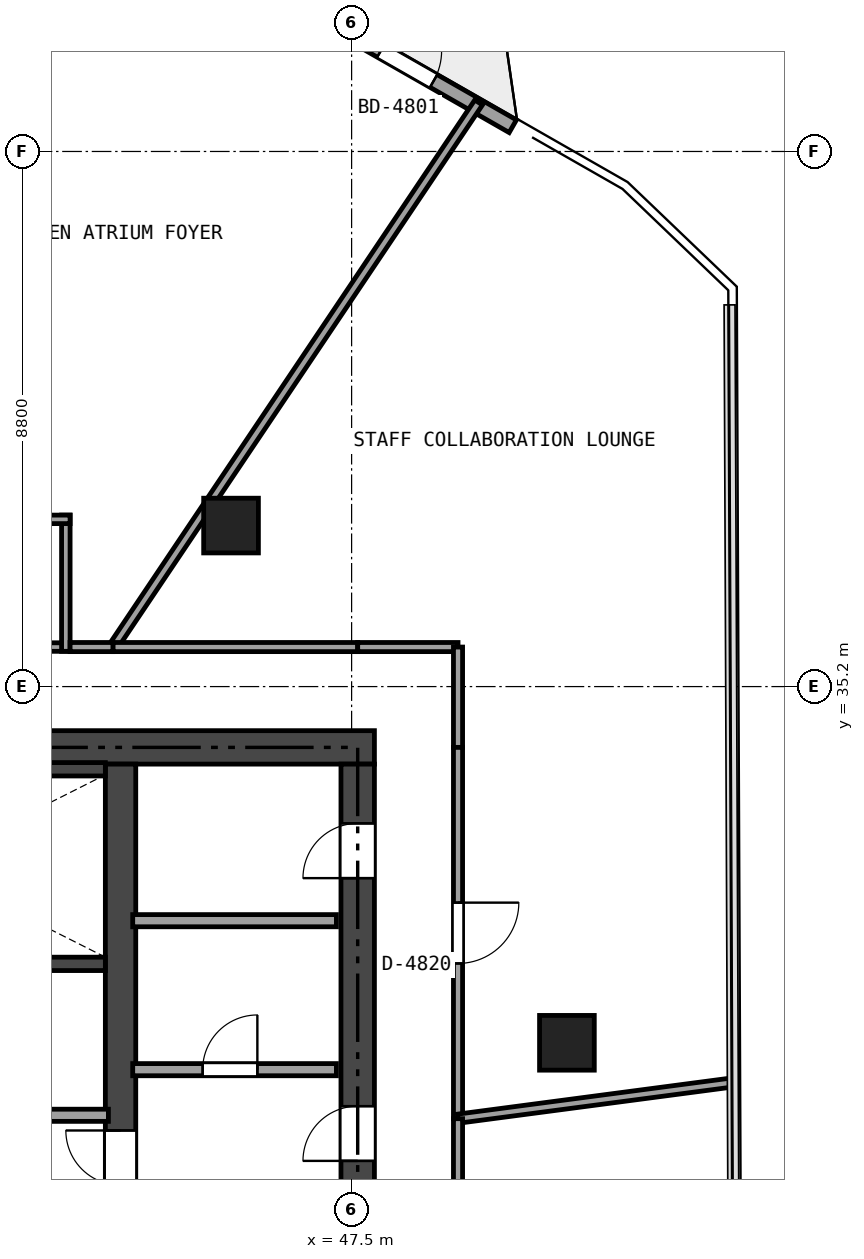
"""IFC4 building model, lengths in metres.
Left out: names, types, materials, properties, quantities, classifications, styles, units other than length and angle.
Written with IfcOpenShell. Run it as: python <this file> out.ifc"""

import sys

from ifc_helpers import new_model, si_unit, direction, frame, frame_2d, origin, origin_2d, place, context, subcontext, project, spatial, rectangle, extrude, element, fill, save


model = new_model("IFC4")
c1 = context("Model", 3, precision=1e-05, world=origin(), true_north=direction((0.0, 1.0)))
c2 = subcontext(c1, "Body", "Model", "MODEL_VIEW")
j1 = project(units=[si_unit("LENGTHUNIT", "METRE"), si_unit("PLANEANGLEUNIT", "RADIAN")], contexts=[c1])
p1 = place(None, origin())
s1 = spatial("IfcSite", under=j1, at=p1, CompositionType="ELEMENT")
p2 = place(p1, origin())
s2 = spatial("IfcBuilding", under=s1, at=p2, CompositionType="ELEMENT")
p3 = place(p2, frame((0.0, 0.0, 180.6)))
s3 = spatial("IfcBuildingStorey", under=s2, at=p3, CompositionType="ELEMENT", Elevation=180.6)
p4 = place(p3, frame((26.525, 34.2, 0.0), z_axis=(0.0, 0.0, 1.0), x_axis=(1.0, 0.0, 0.0)))
e1 = element("IfcWall", 1, at=p4, inside=s3, PredefinedType="SHEAR", context=c2, shape_type="SweptSolid", body=[
    extrude(rectangle(XDim=21.35, YDim=0.55, at=frame_2d((10.675, 0.0))), origin(), (0.0, 0.0, 1.0), 3.32),
])
p5 = place(p4, frame((9.675, 0.0, 0.0)))
e2 = element("IfcOpeningElement", 2, at=p5, cuts=e1, PredefinedType="OPENING", context=c2, shape_type="SweptSolid", body=[
    extrude(rectangle(XDim=1.1, YDim=2.15, at=frame_2d((0.55, 1.075))), frame((0.0, 0.285, 0.0), z_axis=(0.0, -1.0, 0.0), x_axis=(1.0, 0.0, 0.0)), (0.0, 0.0, 1.0), 0.57),
])
p6 = place(p4, frame((1.925, 0.0, 0.0)))
e3 = element("IfcOpeningElement", 3, at=p6, cuts=e1, PredefinedType="OPENING", context=c2, shape_type="SweptSolid", body=[
    extrude(rectangle(XDim=0.9, YDim=2.1, at=frame_2d((0.45, 1.05))), frame((0.0, 0.285, 0.0), z_axis=(0.0, -1.0, 0.0), x_axis=(1.0, 0.0, 0.0)), (0.0, 0.0, 1.0), 0.57),
])
p7 = place(p4, frame((6.225, 0.0, 0.0)))
e4 = element("IfcOpeningElement", 4, at=p7, cuts=e1, PredefinedType="OPENING", context=c2, shape_type="SweptSolid", body=[
    extrude(rectangle(XDim=0.9, YDim=2.1, at=frame_2d((0.45, 1.05))), frame((0.0, 0.285, 0.0), z_axis=(0.0, -1.0, 0.0), x_axis=(1.0, 0.0, 0.0)), (0.0, 0.0, 1.0), 0.57),
])
p8 = place(p3, frame((47.6, 18.875, 0.0), z_axis=(0.0, 0.0, 1.0), x_axis=(0.0, 1.0, 0.0)))
e5 = element("IfcWall", 5, at=p8, inside=s3, PredefinedType="SHEAR", context=c2, shape_type="SweptSolid", body=[
    extrude(rectangle(XDim=15.05, YDim=0.55, at=frame_2d((7.525, 0.0))), origin(), (0.0, 0.0, 1.0), 3.32),
])
p9 = place(p8, frame((6.625, 0.0, 0.0)))
e6 = element("IfcOpeningElement", 6, at=p9, cuts=e5, PredefinedType="OPENING", context=c2, shape_type="SweptSolid", body=[
    extrude(rectangle(XDim=1.1, YDim=2.15, at=frame_2d((0.55, 1.075))), frame((0.0, 0.285, 0.0), z_axis=(0.0, -1.0, 0.0), x_axis=(1.0, 0.0, 0.0)), (0.0, 0.0, 1.0), 0.57),
])
p10 = place(p8, frame((8.525, 0.0, 0.0)))
e7 = element("IfcOpeningElement", 7, at=p10, cuts=e5, PredefinedType="OPENING", context=c2, shape_type="SweptSolid", body=[
    extrude(rectangle(XDim=0.9, YDim=2.1, at=frame_2d((0.45, 1.05))), frame((0.0, 0.285, 0.0), z_axis=(0.0, -1.0, 0.0), x_axis=(1.0, 0.0, 0.0)), (0.0, 0.0, 1.0), 0.57),
])
p11 = place(p8, frame((13.175, 0.0, 0.0)))
e8 = element("IfcOpeningElement", 8, at=p11, cuts=e5, PredefinedType="OPENING", context=c2, shape_type="SweptSolid", body=[
    extrude(rectangle(XDim=0.9, YDim=2.1, at=frame_2d((0.45, 1.05))), frame((0.0, 0.285, 0.0), z_axis=(0.0, -1.0, 0.0), x_axis=(1.0, 0.0, 0.0)), (0.0, 0.0, 1.0), 0.57),
])
p12 = place(p3, frame((43.7, 18.875, 0.0), z_axis=(0.0, 0.0, 1.0), x_axis=(0.0, 1.0, 0.0)))
e9 = element("IfcWall", 9, at=p12, inside=s3, PredefinedType="SHEAR", context=c2, shape_type="SweptSolid", body=[
    extrude(rectangle(XDim=15.05, YDim=0.5, at=frame_2d((7.525, 0.0))), origin(), (0.0, 0.0, 1.0), 3.32),
])
p13 = place(p12, frame((8.125, 0.0, 0.0)))
e10 = element("IfcOpeningElement", 10, at=p13, cuts=e9, PredefinedType="OPENING", context=c2, shape_type="SweptSolid", body=[
    extrude(rectangle(XDim=0.9, YDim=2.1, at=frame_2d((0.45, 1.05))), frame((0.0, 0.26, 0.0), z_axis=(0.0, -1.0, 0.0), x_axis=(1.0, 0.0, 0.0)), (0.0, 0.0, 1.0), 0.52),
])
p14 = place(p3, frame((35.84, 30.64, 0.0), z_axis=(0.0, 0.0, 1.0), x_axis=(1.0, 0.0, 0.0)))
e11 = element("IfcWall", 11, at=p14, inside=s3, PredefinedType="SHEAR", context=c2, shape_type="SweptSolid", body=[
    extrude(rectangle(XDim=7.61, YDim=0.22, at=frame_2d((3.805, 0.0))), origin(), (0.0, 0.0, 1.0), 3.32),
])
p15 = place(p3, frame((37.55, 33.84, 0.0), z_axis=(0.0, 0.0, 1.0), x_axis=(1.0, 0.0, 0.0)))
e12 = element("IfcWall", 12, at=p15, inside=s3, PredefinedType="SHEAR", context=c2, shape_type="SweptSolid", body=[
    extrude(rectangle(XDim=5.9, YDim=0.22, at=frame_2d((2.95, 0.0))), origin(), (0.0, 0.0, 1.0), 3.32),
])
for number, where, z_axis, x_axis in (
    (13, (51.041, 29.342, 0.0), (0.0, 0.0, 1.0), (1.0, 0.0, 0.0)),
    (14, (45.517, 37.848, 0.0), (0.0, 0.0, 1.0), (1.0, 0.0, 0.0)),
):
    element("IfcColumn", number, at=place(p3, frame(where, z_axis=z_axis, x_axis=x_axis)), inside=s3, PredefinedType="COLUMN", context=c2, shape_type="SweptSolid", body=[
        extrude(rectangle(XDim=0.9, YDim=0.9, at=origin_2d()), origin(), (0.0, 0.0, 1.0), 3.32),
    ])
p16 = place(p3, frame((46.678, 46.4, 0.0), z_axis=(0.0, 0.0, 1.0), x_axis=(0.868205580385, -0.496204665626, 0.0)))
e15 = element("IfcWall", 15, at=p16, inside=s3, PredefinedType="SOLIDWALL", context=c2, shape_type="SweptSolid", body=[
    extrude(rectangle(XDim=4.0, YDim=0.24, at=frame_2d((2.0, 0.0))), origin(), (0.0, 0.0, 1.0), 3.32),
])
p17 = place(p16, frame((1.5, 0.0, 0.0)))
e16 = element("IfcOpeningElement", 16, at=p17, cuts=e15, PredefinedType="OPENING", context=c2, shape_type="SweptSolid", body=[
    extrude(rectangle(XDim=1.0, YDim=2.15, at=frame_2d((0.5, 1.075))), frame((0.0, 0.13, 0.0), z_axis=(0.0, -1.0, 0.0), x_axis=(1.0, 0.0, 0.0)), (0.0, 0.0, 1.0), 0.26),
])
p18 = place(p3, frame((43.9, 28.9, 0.0), z_axis=(0.0, 0.0, 1.0), x_axis=(1.0, 0.0, 0.0)))
e17 = element("IfcWall", 17, at=p18, inside=s3, PredefinedType="SOLIDWALL", context=c2, shape_type="SweptSolid", body=[
    extrude(rectangle(XDim=3.35, YDim=0.2, at=frame_2d((1.675, 0.0))), origin(), (0.0, 0.0, 1.0), 3.32),
])
p19 = place(p18, frame((1.15, 0.0, 0.0)))
e18 = element("IfcOpeningElement", 18, at=p19, cuts=e17, PredefinedType="OPENING", context=c2, shape_type="SweptSolid", body=[
    extrude(rectangle(XDim=0.9, YDim=2.1, at=frame_2d((0.45, 1.05))), frame((0.0, 0.11, 0.0), z_axis=(0.0, -1.0, 0.0), x_axis=(1.0, 0.0, 0.0)), (0.0, 0.0, 1.0), 0.22),
])
p20 = place(p3, frame((43.9, 31.35, 0.0), z_axis=(0.0, 0.0, 1.0), x_axis=(1.0, 0.0, 0.0)))
e19 = element("IfcWall", 19, at=p20, inside=s3, PredefinedType="SOLIDWALL", context=c2, shape_type="SweptSolid", body=[
    extrude(rectangle(XDim=3.35, YDim=0.2, at=frame_2d((1.675, 0.0))), origin(), (0.0, 0.0, 1.0), 2.949),
])
p21 = place(p3, frame((35.62, 28.15, 0.0), z_axis=(0.0, 0.0, 1.0), x_axis=(1.0, 0.0, 0.0)))
e20 = element("IfcWall", 20, at=p21, inside=s3, PredefinedType="SOLIDWALL", context=c2, shape_type="SweptSolid", body=[
    extrude(rectangle(XDim=7.88, YDim=0.2, at=frame_2d((3.94, 0.0))), origin(), (0.0, 0.0, 1.0), 3.32),
])
p22 = place(p3, frame((40.43, 35.85, 0.0), z_axis=(0.0, 0.0, 1.0), x_axis=(1.0, 0.0, 0.0)))
e21 = element("IfcWall", 21, at=p22, inside=s3, PredefinedType="PARTITIONING", context=c2, shape_type="SweptSolid", body=[
    extrude(rectangle(XDim=2.44, YDim=0.14, at=frame_2d((1.22, 0.0))), origin(), (0.0, 0.0, 1.0), 2.841),
])
p23 = place(p22, frame((0.76, 0.0, 0.0)))
e22 = element("IfcOpeningElement", 22, at=p23, cuts=e21, PredefinedType="OPENING", context=c2, shape_type="SweptSolid", body=[
    extrude(rectangle(XDim=0.92, YDim=2.1, at=frame_2d((0.46, 1.05))), frame((0.0, 0.08, 0.0), z_axis=(0.0, -1.0, 0.0), x_axis=(1.0, 0.0, 0.0)), (0.0, 0.0, 1.0), 0.16),
])
p24 = place(p3, frame((42.8, 35.78, 0.0), z_axis=(0.0, 0.0, 1.0), x_axis=(0.0, 1.0, 0.0)))
e23 = element("IfcWall", 23, at=p24, inside=s3, PredefinedType="PARTITIONING", context=c2, shape_type="SweptSolid", body=[
    extrude(rectangle(XDim=2.24, YDim=0.14, at=frame_2d((1.12, 0.0))), origin(), (0.0, 0.0, 1.0), 2.949),
])
p25 = place(p3, frame((42.87, 37.95, 0.0), z_axis=(0.0, 0.0, 1.0), x_axis=(-1.0, 0.0, 0.0)))
e24 = element("IfcWall", 24, at=p25, inside=s3, PredefinedType="PARTITIONING", context=c2, shape_type="SweptSolid", body=[
    extrude(rectangle(XDim=2.44, YDim=0.14, at=frame_2d((1.22, 0.0))), origin(), (0.0, 0.0, 1.0), 2.841),
])
p26 = place(p3, frame((49.589, 44.806, 0.0), z_axis=(0.0, 0.0, 1.0), x_axis=(-0.55755874388, -0.83013748688, 0.0)))
e25 = element("IfcWall", 25, at=p26, inside=s3, PredefinedType="PARTITIONING", context=c2, shape_type="SweptSolid", body=[
    extrude(rectangle(XDim=10.788, YDim=0.15, at=frame_2d((5.394, 0.0))), origin(), (0.0, 0.0, 1.0), 2.905),
])
p27 = place(p3, frame((43.574, 35.85, 0.0), z_axis=(0.0, 0.0, 1.0), x_axis=(1.0, 0.0, 0.0)))
e26 = element("IfcWall", 26, at=p27, inside=s3, PredefinedType="PARTITIONING", context=c2, shape_type="SweptSolid", body=[
    extrude(rectangle(XDim=4.026, YDim=0.15, at=frame_2d((2.013, 0.0))), origin(), (0.0, 0.0, 1.0), 2.697),
])
p28 = place(p3, frame((47.6, 35.85, 0.0), z_axis=(0.0, 0.0, 1.0), x_axis=(1.0, 0.0, 0.0)))
e27 = element("IfcWall", 27, at=p28, inside=s3, PredefinedType="PARTITIONING", context=c2, shape_type="SweptSolid", body=[
    extrude(rectangle(XDim=1.65, YDim=0.15, at=frame_2d((0.825, 0.0))), origin(), (0.0, 0.0, 1.0), 3.32),
])
p29 = place(p3, frame((49.25, 35.85, 0.0), z_axis=(0.0, 0.0, 1.0), x_axis=(0.0, -1.0, 0.0)))
e28 = element("IfcWall", 28, at=p29, inside=s3, PredefinedType="PARTITIONING", context=c2, shape_type="SweptSolid", body=[
    extrude(rectangle(XDim=1.65, YDim=0.15, at=frame_2d((0.825, 0.0))), origin(), (0.0, 0.0, 1.0), 3.32),
])
p30 = place(p3, frame((49.25, 34.2, 0.0), z_axis=(0.0, 0.0, 1.0), x_axis=(0.0, -1.0, 0.0)))
e29 = element("IfcWall", 29, at=p30, inside=s3, PredefinedType="PARTITIONING", context=c2, shape_type="SweptSolid", body=[
    extrude(rectangle(XDim=6.106, YDim=0.15, at=frame_2d((3.053, 0.0))), origin(), (0.0, 0.0, 1.0), 2.697),
])
p31 = place(p30, frame((2.553, 0.0, 0.0)))
e30 = element("IfcOpeningElement", 30, at=p31, cuts=e29, PredefinedType="OPENING", context=c2, shape_type="SweptSolid", body=[
    extrude(rectangle(XDim=1.0, YDim=2.15, at=frame_2d((0.5, 1.075))), frame((0.0, 0.085, 0.0), z_axis=(0.0, -1.0, 0.0), x_axis=(1.0, 0.0, 0.0)), (0.0, 0.0, 1.0), 0.17),
])
p32 = place(p3, frame((49.25, 28.094, 0.0), z_axis=(0.0, 0.0, 1.0), x_axis=(0.991396749082, 0.130891122349, 0.0)))
e31 = element("IfcWall", 31, at=p32, inside=s3, PredefinedType="PARTITIONING", context=c2, shape_type="SweptSolid", body=[
    extrude(rectangle(XDim=4.6, YDim=0.15, at=frame_2d((2.3, 0.0))), origin(), (0.0, 0.0, 1.0), 2.905),
])
p33 = place(p3, frame((42.87, 35.85, 0.0), z_axis=(0.0, 0.0, 1.0), x_axis=(1.0, 0.0, 0.0)))
e32 = element("IfcWall", 32, at=p33, inside=s3, PredefinedType="PARTITIONING", context=c2, shape_type="SweptSolid", body=[
    extrude(rectangle(XDim=0.704, YDim=0.15, at=frame_2d((0.352, 0.0))), origin(), (0.0, 0.0, 1.0), 2.949),
])
p34 = place(p3, frame((49.25, 28.094, 0.0), z_axis=(0.0, 0.0, 1.0), x_axis=(0.0, -1.0, 0.0)))
e33 = element("IfcWall", 33, at=p34, inside=s3, PredefinedType="PARTITIONING", context=c2, shape_type="SweptSolid", body=[
    extrude(rectangle(XDim=9.494, YDim=0.15, at=frame_2d((4.747, 0.0))), origin(), (0.0, 0.0, 1.0), 2.697),
])
p35 = place(p34, frame((4.247, 0.0, 0.0)))
e34 = element("IfcOpeningElement", 34, at=p35, cuts=e33, PredefinedType="OPENING", context=c2, shape_type="SweptSolid", body=[
    extrude(rectangle(XDim=1.0, YDim=2.15, at=frame_2d((0.5, 1.075))), frame((0.0, 0.085, 0.0), z_axis=(0.0, -1.0, 0.0), x_axis=(1.0, 0.0, 0.0)), (0.0, 0.0, 1.0), 0.17),
])
p36 = place(p17, origin())
e35 = element("IfcDoor", 35, at=p36, inside=s3, OperationType="SINGLE_SWING_LEFT", PredefinedType="DOOR", context=c2, shape_type="SweptSolid", body=[
    extrude(rectangle(XDim=1.0, YDim=2.15, at=frame_2d((0.5, 1.075))), frame((0.0, 0.025, 0.0), z_axis=(0.0, -1.0, 0.0), x_axis=(1.0, 0.0, 0.0)), (0.0, 0.0, 1.0), 0.05),
])
fill(e16, e35)
p37 = place(p13, origin())
e36 = element("IfcDoor", 36, at=p37, inside=s3, OperationType="SINGLE_SWING_RIGHT", PredefinedType="DOOR", context=c2, shape_type="SweptSolid", body=[
    extrude(rectangle(XDim=0.9, YDim=2.1, at=frame_2d((0.45, 1.05))), frame((0.0, 0.025, 0.0), z_axis=(0.0, -1.0, 0.0), x_axis=(1.0, 0.0, 0.0)), (0.0, 0.0, 1.0), 0.05),
])
fill(e10, e36)
p38 = place(p10, origin())
e37 = element("IfcDoor", 37, at=p38, inside=s3, OperationType="SINGLE_SWING_LEFT", PredefinedType="DOOR", context=c2, shape_type="SweptSolid", body=[
    extrude(rectangle(XDim=0.9, YDim=2.1, at=frame_2d((0.45, 1.05))), frame((0.0, 0.025, 0.0), z_axis=(0.0, -1.0, 0.0), x_axis=(1.0, 0.0, 0.0)), (0.0, 0.0, 1.0), 0.05),
])
fill(e7, e37)
p39 = place(p19, origin())
e38 = element("IfcDoor", 38, at=p39, inside=s3, OperationType="SINGLE_SWING_RIGHT", PredefinedType="DOOR", context=c2, shape_type="SweptSolid", body=[
    extrude(rectangle(XDim=0.9, YDim=2.1, at=frame_2d((0.45, 1.05))), frame((0.0, 0.025, 0.0), z_axis=(0.0, -1.0, 0.0), x_axis=(1.0, 0.0, 0.0)), (0.0, 0.0, 1.0), 0.05),
])
fill(e18, e38)
p40 = place(p11, origin())
e39 = element("IfcDoor", 39, at=p40, inside=s3, OperationType="SINGLE_SWING_LEFT", PredefinedType="DOOR", context=c2, shape_type="SweptSolid", body=[
    extrude(rectangle(XDim=0.9, YDim=2.1, at=frame_2d((0.45, 1.05))), frame((0.0, 0.025, 0.0), z_axis=(0.0, -1.0, 0.0), x_axis=(1.0, 0.0, 0.0)), (0.0, 0.0, 1.0), 0.05),
])
fill(e8, e39)
p41 = place(p31, origin())
e40 = element("IfcDoor", 40, at=p41, inside=s3, OperationType="SINGLE_SWING_LEFT", PredefinedType="DOOR", context=c2, shape_type="SweptSolid", body=[
    extrude(rectangle(XDim=1.0, YDim=2.15, at=frame_2d((0.5, 1.075))), frame((0.0, 0.025, 0.0), z_axis=(0.0, -1.0, 0.0), x_axis=(1.0, 0.0, 0.0)), (0.0, 0.0, 1.0), 0.05),
])
fill(e30, e40)
save(model, sys.argv[1])
